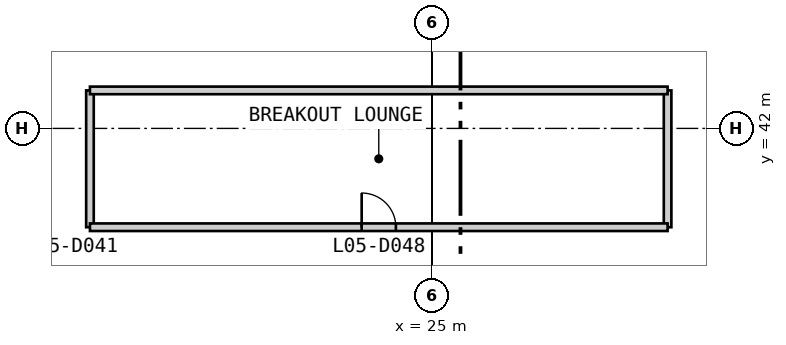
"""IFC4 building model, lengths in metres.
Left out: names, types, materials, properties, quantities, classifications, styles, units other than length and angle.
Written with IfcOpenShell. Run it as: python <this file> out.ifc"""

import sys

from ifc_helpers import new_model, si_unit, direction, frame, frame_2d, origin, place, context, subcontext, project, spatial, rectangle, extrude, element, fill, save


model = new_model("IFC4")
c1 = context("Model", 3, precision=1e-05, world=origin(), true_north=direction((0.0, 1.0)))
c2 = subcontext(c1, "Body", "Model", "MODEL_VIEW")
j1 = project(units=[si_unit("LENGTHUNIT", "METRE"), si_unit("PLANEANGLEUNIT", "RADIAN")], contexts=[c1])
p1 = place(None, origin())
s1 = spatial("IfcSite", under=j1, at=p1, CompositionType="ELEMENT")
p2 = place(p1, origin())
s2 = spatial("IfcBuilding", under=s1, at=p2, CompositionType="ELEMENT")
p3 = place(p2, frame((0.0, 0.0, 26.2)))
s3 = spatial("IfcBuildingStorey", under=s2, at=p3, CompositionType="ELEMENT", Elevation=26.2)
p4 = place(p3, frame((16.0, 39.4, 0.0), z_axis=(0.0, 0.0, 1.0), x_axis=(0.0, 1.0, 0.0)))
e1 = element("IfcWall", 1, at=p4, inside=s3, PredefinedType="PARTITIONING", context=c2, shape_type="SweptSolid", body=[
    extrude(rectangle(XDim=3.6, YDim=0.2, at=frame_2d((1.8, 0.0))), origin(), (0.0, 0.0, 1.0), 3.893),
])
p5 = place(p3, frame((31.2, 39.4, 0.0), z_axis=(0.0, 0.0, 1.0), x_axis=(0.0, 1.0, 0.0)))
e2 = element("IfcWall", 2, at=p5, inside=s3, PredefinedType="PARTITIONING", context=c2, shape_type="SweptSolid", body=[
    extrude(rectangle(XDim=3.6, YDim=0.2, at=frame_2d((1.8, 0.0))), origin(), (0.0, 0.0, 1.0), 4.5),
])
p6 = place(p3, frame((16.0, 39.4, 0.0), z_axis=(0.0, 0.0, 1.0), x_axis=(1.0, 0.0, 0.0)))
e3 = element("IfcWall", 3, at=p6, inside=s3, PredefinedType="PARTITIONING", context=c2, shape_type="SweptSolid", body=[
    extrude(rectangle(XDim=15.2, YDim=0.2, at=frame_2d((7.6, 0.0))), origin(), (0.0, 0.0, 1.0), 4.5),
])
p7 = place(p6, frame((7.15, 0.0, 0.0)))
e4 = element("IfcOpeningElement", 4, at=p7, cuts=e3, PredefinedType="OPENING", context=c2, shape_type="SweptSolid", body=[
    extrude(rectangle(XDim=0.9, YDim=2.2, at=frame_2d((0.45, 1.1))), frame((0.0, 0.11, 0.0), z_axis=(0.0, -1.0, 0.0), x_axis=(1.0, 0.0, 0.0)), (0.0, 0.0, 1.0), 0.22),
])
p8 = place(p3, frame((16.0, 43.0, 0.0), z_axis=(0.0, 0.0, 1.0), x_axis=(1.0, 0.0, 0.0)))
e5 = element("IfcWall", 5, at=p8, inside=s3, PredefinedType="PARTITIONING", context=c2, shape_type="SweptSolid", body=[
    extrude(rectangle(XDim=15.2, YDim=0.2, at=frame_2d((7.6, 0.0))), origin(), (0.0, 0.0, 1.0), 4.5),
])
p9 = place(p7, origin())
e6 = element("IfcDoor", 6, at=p9, inside=s3, OperationType="SINGLE_SWING_LEFT", PredefinedType="DOOR", context=c2, shape_type="SweptSolid", body=[
    extrude(rectangle(XDim=0.9, YDim=2.2, at=frame_2d((0.45, 1.1))), frame((0.0, 0.025, 0.0), z_axis=(0.0, -1.0, 0.0), x_axis=(1.0, 0.0, 0.0)), (0.0, 0.0, 1.0), 0.05),
])
fill(e4, e6)
save(model, sys.argv[1])
